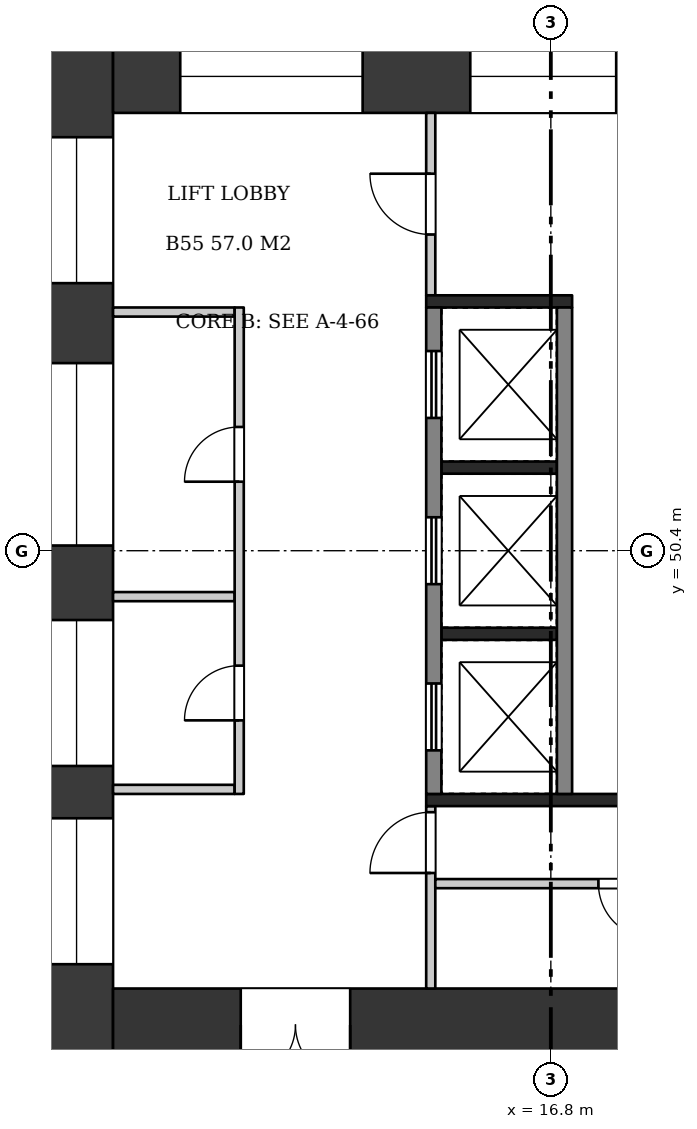
"""IFC4 building model, lengths in metres.
Left out: names, types, materials, properties, quantities, classifications, styles, units other than length and angle.
Written with IfcOpenShell. Run it as: python <this file> out.ifc"""

import sys

from ifc_helpers import new_model, si_unit, direction, frame, frame_2d, origin, place, context, subcontext, project, spatial, rectangle, extrude, element, fill, save


model = new_model("IFC4")
c1 = context("Model", 3, precision=1e-05, world=origin(), true_north=direction((0.0, 1.0)))
c2 = subcontext(c1, "Body", "Model", "MODEL_VIEW")
j1 = project(units=[si_unit("LENGTHUNIT", "METRE"), si_unit("PLANEANGLEUNIT", "RADIAN")], contexts=[c1])
p1 = place(None, origin())
s1 = spatial("IfcSite", under=j1, at=p1, CompositionType="ELEMENT")
p2 = place(p1, origin())
s2 = spatial("IfcBuilding", under=s1, at=p2, CompositionType="ELEMENT")
p3 = place(p2, frame((0.0, 0.0, 214.2)))
s3 = spatial("IfcBuildingStorey", under=s2, at=p3, CompositionType="ELEMENT", Elevation=214.2)
p4 = place(p3, frame((9.0, 58.8, 0.0), z_axis=(0.0, 0.0, 1.0), x_axis=(0.0, -1.0, 0.0)))
e1 = element("IfcWall", 1, at=p4, inside=s3, PredefinedType="SHEAR", context=c2, shape_type="SweptSolid", body=[
    extrude(rectangle(XDim=16.8, YDim=1.2, at=frame_2d((8.4, 0.0))), origin(), (0.0, 0.0, 1.0), 3.22),
])
p5 = place(p4, frame((1.6, 0.0, 0.6)))
e2 = element("IfcOpeningElement", 2, at=p5, cuts=e1, PredefinedType="OPENING", context=c2, shape_type="SweptSolid", body=[
    extrude(rectangle(XDim=2.4, YDim=2.1, at=frame_2d((1.2, 1.05))), frame((0.0, 0.61, 0.0), z_axis=(0.0, -1.0, 0.0), x_axis=(1.0, 0.0, 0.0)), (0.0, 0.0, 1.0), 1.22),
])
p6 = place(p4, frame((5.315, 0.0, 1.6)))
e3 = element("IfcOpeningElement", 3, at=p6, cuts=e1, PredefinedType="OPENING", context=c2, shape_type="SweptSolid", body=[
    extrude(rectangle(XDim=3.0, YDim=1.2, at=frame_2d((1.5, 0.6))), frame((0.0, 0.61, 0.0), z_axis=(0.0, -1.0, 0.0), x_axis=(1.0, 0.0, 0.0)), (0.0, 0.0, 1.0), 1.22),
])
p7 = place(p4, frame((9.54, 0.0, 1.6)))
e4 = element("IfcOpeningElement", 4, at=p7, cuts=e1, PredefinedType="OPENING", context=c2, shape_type="SweptSolid", body=[
    extrude(rectangle(XDim=2.4, YDim=1.2, at=frame_2d((1.2, 0.6))), frame((0.0, 0.61, 0.0), z_axis=(0.0, -1.0, 0.0), x_axis=(1.0, 0.0, 0.0)), (0.0, 0.0, 1.0), 1.22),
])
p8 = place(p4, frame((12.8, 0.0, 0.6)))
e5 = element("IfcOpeningElement", 5, at=p8, cuts=e1, PredefinedType="OPENING", context=c2, shape_type="SweptSolid", body=[
    extrude(rectangle(XDim=2.4, YDim=2.1, at=frame_2d((1.2, 1.05))), frame((0.0, 0.61, 0.0), z_axis=(0.0, -1.0, 0.0), x_axis=(1.0, 0.0, 0.0)), (0.0, 0.0, 1.0), 1.22),
])
p9 = place(p3, frame((9.6, 58.2, 0.0), z_axis=(0.0, 0.0, 1.0), x_axis=(1.0, 0.0, 0.0)))
e6 = element("IfcWall", 6, at=p9, inside=s3, PredefinedType="SHEAR", context=c2, shape_type="SweptSolid", body=[
    extrude(rectangle(XDim=14.4, YDim=1.2, at=frame_2d((7.2, 0.0))), origin(), (0.0, 0.0, 1.0), 3.22),
])
p10 = place(p9, frame((1.105, 0.0, 0.6)))
e7 = element("IfcOpeningElement", 7, at=p10, cuts=e6, PredefinedType="OPENING", context=c2, shape_type="SweptSolid", body=[
    extrude(rectangle(XDim=3.0, YDim=2.1, at=frame_2d((1.5, 1.05))), frame((0.0, 0.61, 0.0), z_axis=(0.0, -1.0, 0.0), x_axis=(1.0, 0.0, 0.0)), (0.0, 0.0, 1.0), 1.22),
])
p11 = place(p9, frame((5.875, 0.0, 0.6)))
e8 = element("IfcOpeningElement", 8, at=p11, cuts=e6, PredefinedType="OPENING", context=c2, shape_type="SweptSolid", body=[
    extrude(rectangle(XDim=2.4, YDim=2.1, at=frame_2d((1.2, 1.05))), frame((0.0, 0.61, 0.0), z_axis=(0.0, -1.0, 0.0), x_axis=(1.0, 0.0, 0.0)), (0.0, 0.0, 1.0), 1.22),
])
p12 = place(p9, frame((9.993, 0.0, 0.5)))
e9 = element("IfcOpeningElement", 9, at=p12, cuts=e6, PredefinedType="OPENING", context=c2, shape_type="SweptSolid", body=[
    extrude(rectangle(XDim=1.2, YDim=2.4, at=frame_2d((0.6, 1.2))), frame((0.0, 0.61, 0.0), z_axis=(0.0, -1.0, 0.0), x_axis=(1.0, 0.0, 0.0)), (0.0, 0.0, 1.0), 1.22),
])
p13 = place(p9, frame((12.197, 0.0, 0.5)))
e10 = element("IfcOpeningElement", 10, at=p13, cuts=e6, PredefinedType="OPENING", context=c2, shape_type="SweptSolid", body=[
    extrude(rectangle(XDim=1.2, YDim=2.4, at=frame_2d((0.6, 1.2))), frame((0.0, 0.61, 0.0), z_axis=(0.0, -1.0, 0.0), x_axis=(1.0, 0.0, 0.0)), (0.0, 0.0, 1.0), 1.22),
])
p14 = place(p3, frame((9.6, 42.6, 0.0), z_axis=(0.0, 0.0, 1.0), x_axis=(1.0, 0.0, 0.0)))
e11 = element("IfcWall", 11, at=p14, inside=s3, PredefinedType="SHEAR", context=c2, shape_type="SweptSolid", body=[
    extrude(rectangle(XDim=14.4, YDim=1.2, at=frame_2d((7.2, 0.0))), origin(), (0.0, 0.0, 1.0), 3.22),
])
p15 = place(p14, frame((2.1, 0.0, 0.0)))
e12 = element("IfcOpeningElement", 12, at=p15, cuts=e11, PredefinedType="OPENING", context=c2, shape_type="SweptSolid", body=[
    extrude(rectangle(XDim=1.8, YDim=2.1, at=frame_2d((0.9, 1.05))), frame((0.0, 0.61, 0.0), z_axis=(0.0, -1.0, 0.0), x_axis=(1.0, 0.0, 0.0)), (0.0, 0.0, 1.0), 1.22),
])
for number, where, z_axis, x_axis in (
    (13, (9.6, 54.325, 0.0), (0.0, 0.0, 1.0), (1.0, 0.0, 0.0)),
    (14, (9.6, 46.475, 0.0), (0.0, 0.0, 1.0), (1.0, 0.0, 0.0)),
    (15, (9.6, 49.645, 0.0), (0.0, 0.0, 1.0), (1.0, 0.0, 0.0)),
):
    element("IfcWall", number, at=place(p3, frame(where, z_axis=z_axis, x_axis=x_axis)), inside=s3, PredefinedType="PARTITIONING", context=c2, shape_type="SweptSolid", body=[
        extrude(rectangle(XDim=2.0, YDim=0.15, at=frame_2d((1.0, 0.0))), origin(), (0.0, 0.0, 1.0), 3.22),
    ])
p16 = place(p3, frame((11.675, 54.4, 0.0), z_axis=(0.0, 0.0, 1.0), x_axis=(0.0, -1.0, 0.0)))
e16 = element("IfcWall", 16, at=p16, inside=s3, PredefinedType="PARTITIONING", context=c2, shape_type="SweptSolid", body=[
    extrude(rectangle(XDim=8.0, YDim=0.15, at=frame_2d((4.0, 0.0))), origin(), (0.0, 0.0, 1.0), 3.22),
])
p17 = place(p16, frame((1.965, 0.0, 0.0)))
e17 = element("IfcOpeningElement", 17, at=p17, cuts=e16, PredefinedType="OPENING", context=c2, shape_type="SweptSolid", body=[
    extrude(rectangle(XDim=0.9, YDim=2.1, at=frame_2d((0.45, 1.05))), frame((0.0, 0.085, 0.0), z_axis=(0.0, -1.0, 0.0), x_axis=(1.0, 0.0, 0.0)), (0.0, 0.0, 1.0), 0.17),
])
p18 = place(p16, frame((5.89, 0.0, 0.0)))
e18 = element("IfcOpeningElement", 18, at=p18, cuts=e16, PredefinedType="OPENING", context=c2, shape_type="SweptSolid", body=[
    extrude(rectangle(XDim=0.9, YDim=2.1, at=frame_2d((0.45, 1.05))), frame((0.0, 0.085, 0.0), z_axis=(0.0, -1.0, 0.0), x_axis=(1.0, 0.0, 0.0)), (0.0, 0.0, 1.0), 0.17),
])
for number, where, z_axis, x_axis in (
    (19, (15.0, 51.767, 0.0), (0.0, 0.0, 1.0), (1.0, 0.0, 0.0)),
    (20, (15.0, 49.033, 0.0), (0.0, 0.0, 1.0), (1.0, 0.0, 0.0)),
):
    element("IfcWall", number, at=place(p3, frame(where, z_axis=z_axis, x_axis=x_axis)), inside=s3, PredefinedType="SHEAR", context=c2, shape_type="SweptSolid", body=[
        extrude(rectangle(XDim=1.9, YDim=0.2, at=frame_2d((0.95, 0.0))), origin(), (0.0, 0.0, 1.0), 3.22),
    ])
p19 = place(p3, frame((14.875, 54.4, 0.0), z_axis=(0.0, 0.0, 1.0), x_axis=(0.0, -1.0, 0.0)))
e21 = element("IfcWall", 21, at=p19, inside=s3, PredefinedType="SHEAR", context=c2, shape_type="SweptSolid", body=[
    extrude(rectangle(XDim=8.0, YDim=0.25, at=frame_2d((4.0, 0.0))), origin(), (0.0, 0.0, 1.0), 3.22),
])
p20 = place(p19, frame((0.717, 0.0, 0.0)))
e22 = element("IfcOpeningElement", 22, at=p20, cuts=e21, PredefinedType="OPENING", context=c2, shape_type="SweptSolid", body=[
    extrude(rectangle(XDim=1.1, YDim=2.1, at=frame_2d((0.55, 1.05))), frame((0.0, 0.135, 0.0), z_axis=(0.0, -1.0, 0.0), x_axis=(1.0, 0.0, 0.0)), (0.0, 0.0, 1.0), 0.27),
])
p21 = place(p19, frame((3.45, 0.0, 0.0)))
e23 = element("IfcOpeningElement", 23, at=p21, cuts=e21, PredefinedType="OPENING", context=c2, shape_type="SweptSolid", body=[
    extrude(rectangle(XDim=1.1, YDim=2.1, at=frame_2d((0.55, 1.05))), frame((0.0, 0.135, 0.0), z_axis=(0.0, -1.0, 0.0), x_axis=(1.0, 0.0, 0.0)), (0.0, 0.0, 1.0), 0.27),
])
p22 = place(p19, frame((6.183, 0.0, 0.0)))
e24 = element("IfcOpeningElement", 24, at=p22, cuts=e21, PredefinedType="OPENING", context=c2, shape_type="SweptSolid", body=[
    extrude(rectangle(XDim=1.1, YDim=2.1, at=frame_2d((0.55, 1.05))), frame((0.0, 0.135, 0.0), z_axis=(0.0, -1.0, 0.0), x_axis=(1.0, 0.0, 0.0)), (0.0, 0.0, 1.0), 0.27),
])
p23 = place(p3, frame((17.025, 54.4, 0.0), z_axis=(0.0, 0.0, 1.0), x_axis=(0.0, -1.0, 0.0)))
e25 = element("IfcWall", 25, at=p23, inside=s3, PredefinedType="SHEAR", context=c2, shape_type="SweptSolid", body=[
    extrude(rectangle(XDim=8.0, YDim=0.25, at=frame_2d((4.0, 0.0))), origin(), (0.0, 0.0, 1.0), 3.22),
])
p24 = place(p3, frame((14.75, 54.5, 0.0), z_axis=(0.0, 0.0, 1.0), x_axis=(1.0, 0.0, 0.0)))
e26 = element("IfcWall", 26, at=p24, inside=s3, PredefinedType="SHEAR", context=c2, shape_type="SweptSolid", body=[
    extrude(rectangle(XDim=2.4, YDim=0.2, at=frame_2d((1.2, 0.0))), origin(), (0.0, 0.0, 1.0), 3.22),
])
p25 = place(p3, frame((14.825, 57.6, 0.0), z_axis=(0.0, 0.0, 1.0), x_axis=(0.0, -1.0, 0.0)))
e27 = element("IfcWall", 27, at=p25, inside=s3, PredefinedType="PARTITIONING", context=c2, shape_type="SweptSolid", body=[
    extrude(rectangle(XDim=3.0, YDim=0.15, at=frame_2d((1.5, 0.0))), origin(), (0.0, 0.0, 1.0), 3.22),
])
p26 = place(p25, frame((1.0, 0.0, 0.0)))
e28 = element("IfcOpeningElement", 28, at=p26, cuts=e27, PredefinedType="OPENING", context=c2, shape_type="SweptSolid", body=[
    extrude(rectangle(XDim=1.0, YDim=2.1, at=frame_2d((0.5, 1.05))), frame((0.0, 0.085, 0.0), z_axis=(0.0, -1.0, 0.0), x_axis=(1.0, 0.0, 0.0)), (0.0, 0.0, 1.0), 0.17),
])
p27 = place(p3, frame((14.75, 46.3, 0.0), z_axis=(0.0, 0.0, 1.0), x_axis=(1.0, 0.0, 0.0)))
e29 = element("IfcWall", 29, at=p27, inside=s3, PredefinedType="SHEAR", context=c2, shape_type="SweptSolid", body=[
    extrude(rectangle(XDim=9.25, YDim=0.2, at=frame_2d((4.625, 0.0))), origin(), (0.0, 0.0, 1.0), 3.22),
])
p28 = place(p3, frame((14.825, 46.2, 0.0), z_axis=(0.0, 0.0, 1.0), x_axis=(0.0, -1.0, 0.0)))
e30 = element("IfcWall", 30, at=p28, inside=s3, PredefinedType="PARTITIONING", context=c2, shape_type="SweptSolid", body=[
    extrude(rectangle(XDim=3.0, YDim=0.15, at=frame_2d((1.5, 0.0))), origin(), (0.0, 0.0, 1.0), 3.22),
])
p29 = place(p28, frame((0.1, 0.0, 0.0)))
e31 = element("IfcOpeningElement", 31, at=p29, cuts=e30, PredefinedType="OPENING", context=c2, shape_type="SweptSolid", body=[
    extrude(rectangle(XDim=1.0, YDim=2.1, at=frame_2d((0.5, 1.05))), frame((0.0, 0.085, 0.0), z_axis=(0.0, -1.0, 0.0), x_axis=(1.0, 0.0, 0.0)), (0.0, 0.0, 1.0), 0.17),
])
p30 = place(p3, frame((14.9, 44.925, 0.0), z_axis=(0.0, 0.0, 1.0), x_axis=(1.0, 0.0, 0.0)))
e32 = element("IfcWall", 32, at=p30, inside=s3, PredefinedType="PARTITIONING", context=c2, shape_type="SweptSolid", body=[
    extrude(rectangle(XDim=9.1, YDim=0.15, at=frame_2d((4.55, 0.0))), origin(), (0.0, 0.0, 1.0), 3.22),
])
p31 = place(p30, frame((2.683, 0.0, 0.0)))
e33 = element("IfcOpeningElement", 33, at=p31, cuts=e32, PredefinedType="OPENING", context=c2, shape_type="SweptSolid", body=[
    extrude(rectangle(XDim=0.9, YDim=2.1, at=frame_2d((0.45, 1.05))), frame((0.0, 0.085, 0.0), z_axis=(0.0, -1.0, 0.0), x_axis=(1.0, 0.0, 0.0)), (0.0, 0.0, 1.0), 0.17),
])
p32 = place(p30, frame((7.308, 0.0, 0.0)))
e34 = element("IfcOpeningElement", 34, at=p32, cuts=e32, PredefinedType="OPENING", context=c2, shape_type="SweptSolid", body=[
    extrude(rectangle(XDim=0.9, YDim=2.1, at=frame_2d((0.45, 1.05))), frame((0.0, 0.085, 0.0), z_axis=(0.0, -1.0, 0.0), x_axis=(1.0, 0.0, 0.0)), (0.0, 0.0, 1.0), 0.17),
])
p33 = place(p15, frame((1.8, 0.0, 0.0), z_axis=(0.0, 0.0, 1.0), x_axis=(-1.0, 0.0, 0.0)))
e35 = element("IfcDoor", 35, at=p33, inside=s3, OperationType="DOUBLE_DOOR_SINGLE_SWING", PredefinedType="DOOR", context=c2, shape_type="SweptSolid", body=[
    extrude(rectangle(XDim=1.8, YDim=2.1, at=frame_2d((0.9, 1.05))), frame((0.0, 0.025, 0.0), z_axis=(0.0, -1.0, 0.0), x_axis=(1.0, 0.0, 0.0)), (0.0, 0.0, 1.0), 0.05),
])
fill(e12, e35)
p34 = place(p17, frame((0.9, 0.0, 0.0), z_axis=(0.0, 0.0, 1.0), x_axis=(-1.0, 0.0, 0.0)))
e36 = element("IfcDoor", 36, at=p34, inside=s3, OperationType="SINGLE_SWING_LEFT", PredefinedType="DOOR", context=c2, shape_type="SweptSolid", body=[
    extrude(rectangle(XDim=0.9, YDim=2.1, at=frame_2d((0.45, 1.05))), frame((0.0, 0.025, 0.0), z_axis=(0.0, -1.0, 0.0), x_axis=(1.0, 0.0, 0.0)), (0.0, 0.0, 1.0), 0.05),
])
fill(e17, e36)
p35 = place(p18, frame((0.9, 0.0, 0.0), z_axis=(0.0, 0.0, 1.0), x_axis=(-1.0, 0.0, 0.0)))
e37 = element("IfcDoor", 37, at=p35, inside=s3, OperationType="SINGLE_SWING_LEFT", PredefinedType="DOOR", context=c2, shape_type="SweptSolid", body=[
    extrude(rectangle(XDim=0.9, YDim=2.1, at=frame_2d((0.45, 1.05))), frame((0.0, 0.025, 0.0), z_axis=(0.0, -1.0, 0.0), x_axis=(1.0, 0.0, 0.0)), (0.0, 0.0, 1.0), 0.05),
])
fill(e18, e37)
p36 = place(p20, origin())
e38 = element("IfcDoor", 38, at=p36, inside=s3, OperationType="DOUBLE_DOOR_SLIDING", PredefinedType="DOOR", context=c2, shape_type="SweptSolid", body=[
    extrude(rectangle(XDim=1.1, YDim=2.1, at=frame_2d((0.55, 1.05))), frame((0.0, 0.025, 0.0), z_axis=(0.0, -1.0, 0.0), x_axis=(1.0, 0.0, 0.0)), (0.0, 0.0, 1.0), 0.05),
])
fill(e22, e38)
p37 = place(p21, origin())
e39 = element("IfcDoor", 39, at=p37, inside=s3, OperationType="DOUBLE_DOOR_SLIDING", PredefinedType="DOOR", context=c2, shape_type="SweptSolid", body=[
    extrude(rectangle(XDim=1.1, YDim=2.1, at=frame_2d((0.55, 1.05))), frame((0.0, 0.025, 0.0), z_axis=(0.0, -1.0, 0.0), x_axis=(1.0, 0.0, 0.0)), (0.0, 0.0, 1.0), 0.05),
])
fill(e23, e39)
p38 = place(p22, origin())
e40 = element("IfcDoor", 40, at=p38, inside=s3, OperationType="DOUBLE_DOOR_SLIDING", PredefinedType="DOOR", context=c2, shape_type="SweptSolid", body=[
    extrude(rectangle(XDim=1.1, YDim=2.1, at=frame_2d((0.55, 1.05))), frame((0.0, 0.025, 0.0), z_axis=(0.0, -1.0, 0.0), x_axis=(1.0, 0.0, 0.0)), (0.0, 0.0, 1.0), 0.05),
])
fill(e24, e40)
p39 = place(p26, frame((1.0, 0.0, 0.0), z_axis=(0.0, 0.0, 1.0), x_axis=(-1.0, 0.0, 0.0)))
e41 = element("IfcDoor", 41, at=p39, inside=s3, OperationType="SINGLE_SWING_RIGHT", PredefinedType="DOOR", context=c2, shape_type="SweptSolid", body=[
    extrude(rectangle(XDim=1.0, YDim=2.1, at=frame_2d((0.5, 1.05))), frame((0.0, 0.025, 0.0), z_axis=(0.0, -1.0, 0.0), x_axis=(1.0, 0.0, 0.0)), (0.0, 0.0, 1.0), 0.05),
])
fill(e28, e41)
p40 = place(p29, frame((1.0, 0.0, 0.0), z_axis=(0.0, 0.0, 1.0), x_axis=(-1.0, 0.0, 0.0)))
e42 = element("IfcDoor", 42, at=p40, inside=s3, OperationType="SINGLE_SWING_LEFT", PredefinedType="DOOR", context=c2, shape_type="SweptSolid", body=[
    extrude(rectangle(XDim=1.0, YDim=2.1, at=frame_2d((0.5, 1.05))), frame((0.0, 0.025, 0.0), z_axis=(0.0, -1.0, 0.0), x_axis=(1.0, 0.0, 0.0)), (0.0, 0.0, 1.0), 0.05),
])
fill(e31, e42)
p41 = place(p31, frame((0.9, 0.0, 0.0), z_axis=(0.0, 0.0, 1.0), x_axis=(-1.0, 0.0, 0.0)))
e43 = element("IfcDoor", 43, at=p41, inside=s3, OperationType="SINGLE_SWING_LEFT", PredefinedType="DOOR", context=c2, shape_type="SweptSolid", body=[
    extrude(rectangle(XDim=0.9, YDim=2.1, at=frame_2d((0.45, 1.05))), frame((0.0, 0.025, 0.0), z_axis=(0.0, -1.0, 0.0), x_axis=(1.0, 0.0, 0.0)), (0.0, 0.0, 1.0), 0.05),
])
fill(e33, e43)
p42 = place(p5, origin())
e44 = element("IfcWindow", 44, at=p42, inside=s3, PartitioningType="SINGLE_PANEL", PredefinedType="WINDOW", context=c2, shape_type="SweptSolid", body=[
    extrude(rectangle(XDim=2.4, YDim=2.1, at=frame_2d((1.2, 1.05))), frame((0.0, 0.03, 0.0), z_axis=(0.0, -1.0, 0.0), x_axis=(1.0, 0.0, 0.0)), (0.0, 0.0, 1.0), 0.06),
])
fill(e2, e44)
p43 = place(p6, origin())
e45 = element("IfcWindow", 45, at=p43, inside=s3, PartitioningType="SINGLE_PANEL", PredefinedType="WINDOW", context=c2, shape_type="SweptSolid", body=[
    extrude(rectangle(XDim=3.0, YDim=1.2, at=frame_2d((1.5, 0.6))), frame((0.0, 0.03, 0.0), z_axis=(0.0, -1.0, 0.0), x_axis=(1.0, 0.0, 0.0)), (0.0, 0.0, 1.0), 0.06),
])
fill(e3, e45)
p44 = place(p7, origin())
e46 = element("IfcWindow", 46, at=p44, inside=s3, PartitioningType="SINGLE_PANEL", PredefinedType="WINDOW", context=c2, shape_type="SweptSolid", body=[
    extrude(rectangle(XDim=2.4, YDim=1.2, at=frame_2d((1.2, 0.6))), frame((0.0, 0.03, 0.0), z_axis=(0.0, -1.0, 0.0), x_axis=(1.0, 0.0, 0.0)), (0.0, 0.0, 1.0), 0.06),
])
fill(e4, e46)
p45 = place(p8, origin())
e47 = element("IfcWindow", 47, at=p45, inside=s3, PartitioningType="SINGLE_PANEL", PredefinedType="WINDOW", context=c2, shape_type="SweptSolid", body=[
    extrude(rectangle(XDim=2.4, YDim=2.1, at=frame_2d((1.2, 1.05))), frame((0.0, 0.03, 0.0), z_axis=(0.0, -1.0, 0.0), x_axis=(1.0, 0.0, 0.0)), (0.0, 0.0, 1.0), 0.06),
])
fill(e5, e47)
p46 = place(p10, origin())
e48 = element("IfcWindow", 48, at=p46, inside=s3, PartitioningType="SINGLE_PANEL", PredefinedType="WINDOW", context=c2, shape_type="SweptSolid", body=[
    extrude(rectangle(XDim=3.0, YDim=2.1, at=frame_2d((1.5, 1.05))), frame((0.0, 0.03, 0.0), z_axis=(0.0, -1.0, 0.0), x_axis=(1.0, 0.0, 0.0)), (0.0, 0.0, 1.0), 0.06),
])
fill(e7, e48)
p47 = place(p11, origin())
e49 = element("IfcWindow", 49, at=p47, inside=s3, PartitioningType="SINGLE_PANEL", PredefinedType="WINDOW", context=c2, shape_type="SweptSolid", body=[
    extrude(rectangle(XDim=2.4, YDim=2.1, at=frame_2d((1.2, 1.05))), frame((0.0, 0.03, 0.0), z_axis=(0.0, -1.0, 0.0), x_axis=(1.0, 0.0, 0.0)), (0.0, 0.0, 1.0), 0.06),
])
fill(e8, e49)
save(model, sys.argv[1])
